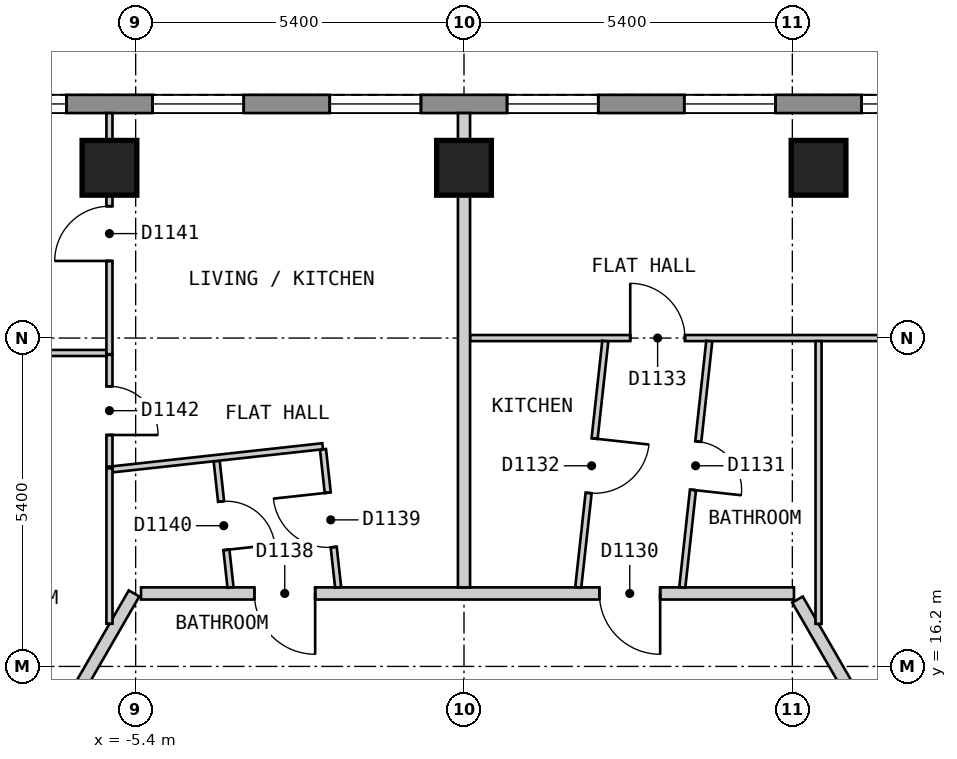
"""IFC4 building model, lengths in metres.
Left out: names, types, materials, properties, quantities, classifications, styles, units other than length and angle.
Written with IfcOpenShell. Run it as: python <this file> out.ifc"""

import sys

from ifc_helpers import new_model, si_unit, direction, frame, frame_2d, origin, origin_2d, place, context, subcontext, project, spatial, polyline, rectangle, outline, extrude, element, fill, save


model = new_model("IFC4")
c1 = context("Model", 3, precision=1e-05, world=origin(), true_north=direction((0.0, 1.0)))
c2 = subcontext(c1, "Body", "Model", "MODEL_VIEW")
j1 = project(units=[si_unit("LENGTHUNIT", "METRE"), si_unit("PLANEANGLEUNIT", "RADIAN")], contexts=[c1])
p1 = place(None, origin())
s1 = spatial("IfcSite", under=j1, at=p1, CompositionType="ELEMENT")
p2 = place(p1, origin())
s2 = spatial("IfcBuilding", under=s1, at=p2, CompositionType="ELEMENT")
p3 = place(p2, frame((0.0, 0.0, 138.6)))
s3 = spatial("IfcBuildingStorey", under=s2, at=p3, CompositionType="ELEMENT", Elevation=138.6)
for number, where, z_axis, x_axis in (
    (1, (5.831, 24.4, 0.0), (0.0, 0.0, 1.0), (-1.0, 0.0, 0.0)),
    (2, (0.0, 24.4, 0.0), (0.0, 0.0, 1.0), (-1.0, 0.0, 0.0)),
    (3, (-5.831, 24.4, 0.0), (0.0, 0.0, 1.0), (-1.0, 0.0, 0.0)),
):
    element("IfcColumn", number, at=place(p3, frame(where, z_axis=z_axis, x_axis=x_axis)), inside=s3, PredefinedType="COLUMN", context=c2, shape_type="SweptSolid", body=[
        extrude(rectangle(XDim=0.9, YDim=0.9, at=origin_2d()), origin(), (0.0, 0.0, 1.0), 3.0),
    ])
p4 = place(p3, frame((12.355, 25.45, 0.0), z_axis=(0.0, 0.0, 1.0), x_axis=(-1.0, 0.0, 0.0)))
e4 = element("IfcWall", 4, at=p4, inside=s3, PredefinedType="SOLIDWALL", context=c2, shape_type="SweptSolid", body=[
    extrude(outline(polyline([(0.0, -0.15), (24.71, -0.15), (24.63, 0.15), (0.08, 0.15), (0.0, -0.15)])), origin(), (0.0, 0.0, 1.0), 2.7),
])
p5 = place(p4, frame((1.401, 0.0, 0.15)))
e5 = element("IfcOpeningElement", 5, at=p5, cuts=e4, PredefinedType="OPENING", context=c2, shape_type="SweptSolid", body=[
    extrude(rectangle(XDim=1.5, YDim=2.1, at=frame_2d((0.75, 1.05))), frame((0.0, 0.16, 0.0), z_axis=(0.0, -1.0, 0.0), x_axis=(1.0, 0.0, 0.0)), (0.0, 0.0, 1.0), 0.32),
])
p6 = place(p4, frame((4.316, 0.0, 0.15)))
e6 = element("IfcOpeningElement", 6, at=p6, cuts=e4, PredefinedType="OPENING", context=c2, shape_type="SweptSolid", body=[
    extrude(rectangle(XDim=1.5, YDim=2.1, at=frame_2d((0.75, 1.05))), frame((0.0, 0.16, 0.0), z_axis=(0.0, -1.0, 0.0), x_axis=(1.0, 0.0, 0.0)), (0.0, 0.0, 1.0), 0.32),
])
p7 = place(p4, frame((7.232, 0.0, 0.15)))
e7 = element("IfcOpeningElement", 7, at=p7, cuts=e4, PredefinedType="OPENING", context=c2, shape_type="SweptSolid", body=[
    extrude(rectangle(XDim=1.5, YDim=2.1, at=frame_2d((0.75, 1.05))), frame((0.0, 0.16, 0.0), z_axis=(0.0, -1.0, 0.0), x_axis=(1.0, 0.0, 0.0)), (0.0, 0.0, 1.0), 0.32),
])
p8 = place(p4, frame((10.147, 0.0, 0.15)))
e8 = element("IfcOpeningElement", 8, at=p8, cuts=e4, PredefinedType="OPENING", context=c2, shape_type="SweptSolid", body=[
    extrude(rectangle(XDim=1.5, YDim=2.1, at=frame_2d((0.75, 1.05))), frame((0.0, 0.16, 0.0), z_axis=(0.0, -1.0, 0.0), x_axis=(1.0, 0.0, 0.0)), (0.0, 0.0, 1.0), 0.32),
])
p9 = place(p4, frame((13.063, 0.0, 0.15)))
e9 = element("IfcOpeningElement", 9, at=p9, cuts=e4, PredefinedType="OPENING", context=c2, shape_type="SweptSolid", body=[
    extrude(rectangle(XDim=1.5, YDim=2.1, at=frame_2d((0.75, 1.05))), frame((0.0, 0.16, 0.0), z_axis=(0.0, -1.0, 0.0), x_axis=(1.0, 0.0, 0.0)), (0.0, 0.0, 1.0), 0.32),
])
p10 = place(p4, frame((15.978, 0.0, 0.15)))
e10 = element("IfcOpeningElement", 10, at=p10, cuts=e4, PredefinedType="OPENING", context=c2, shape_type="SweptSolid", body=[
    extrude(rectangle(XDim=1.5, YDim=2.1, at=frame_2d((0.75, 1.05))), frame((0.0, 0.16, 0.0), z_axis=(0.0, -1.0, 0.0), x_axis=(1.0, 0.0, 0.0)), (0.0, 0.0, 1.0), 0.32),
])
p11 = place(p4, frame((18.894, 0.0, 0.15)))
e11 = element("IfcOpeningElement", 11, at=p11, cuts=e4, PredefinedType="OPENING", context=c2, shape_type="SweptSolid", body=[
    extrude(rectangle(XDim=1.5, YDim=2.1, at=frame_2d((0.75, 1.05))), frame((0.0, 0.16, 0.0), z_axis=(0.0, -1.0, 0.0), x_axis=(1.0, 0.0, 0.0)), (0.0, 0.0, 1.0), 0.32),
])
p12 = place(p4, frame((21.809, 0.0, 0.15)))
e12 = element("IfcOpeningElement", 12, at=p12, cuts=e4, PredefinedType="OPENING", context=c2, shape_type="SweptSolid", body=[
    extrude(rectangle(XDim=1.5, YDim=2.1, at=frame_2d((0.75, 1.05))), frame((0.0, 0.16, 0.0), z_axis=(0.0, -1.0, 0.0), x_axis=(1.0, 0.0, 0.0)), (0.0, 0.0, 1.0), 0.32),
])
p13 = place(p3, frame((5.485, 17.3, 0.0), z_axis=(0.0, 0.0, 1.0), x_axis=(0.500027479704, -0.866009537788, 0.0)))
e13 = element("IfcWall", 13, at=p13, inside=s3, PredefinedType="PARTITIONING", context=c2, shape_type="SweptSolid", body=[
    extrude(rectangle(XDim=2.309, YDim=0.2, at=frame_2d((1.155, 0.0))), origin(), (0.0, 0.0, 1.0), 2.7),
])
p14 = place(p3, frame((-5.312, 17.4, 0.0), z_axis=(0.0, 0.0, 1.0), x_axis=(1.0, 0.0, 0.0)))
e14 = element("IfcWall", 14, at=p14, inside=s3, PredefinedType="PARTITIONING", context=c2, shape_type="SweptSolid", body=[
    extrude(rectangle(XDim=10.739, YDim=0.2, at=frame_2d((5.37, 0.0))), origin(), (0.0, 0.0, 1.0), 2.7),
])
p15 = place(p14, frame((7.538, 0.0, 0.0)))
e15 = element("IfcOpeningElement", 15, at=p15, cuts=e14, PredefinedType="OPENING", context=c2, shape_type="SweptSolid", body=[
    extrude(rectangle(XDim=1.0, YDim=2.1, at=frame_2d((0.5, 1.05))), frame((0.0, 0.11, 0.0), z_axis=(0.0, -1.0, 0.0), x_axis=(1.0, 0.0, 0.0)), (0.0, 0.0, 1.0), 0.22),
])
p16 = place(p14, frame((1.864, 0.0, 0.0)))
e16 = element("IfcOpeningElement", 16, at=p16, cuts=e14, PredefinedType="OPENING", context=c2, shape_type="SweptSolid", body=[
    extrude(rectangle(XDim=1.0, YDim=2.1, at=frame_2d((0.5, 1.05))), frame((0.0, 0.11, 0.0), z_axis=(0.0, -1.0, 0.0), x_axis=(1.0, 0.0, 0.0)), (0.0, 0.0, 1.0), 0.22),
])
p17 = place(p3, frame((-6.697, 15.2, 0.0), z_axis=(0.0, 0.0, 1.0), x_axis=(0.499963722229, 0.866046347752, 0.0)))
e17 = element("IfcWall", 17, at=p17, inside=s3, PredefinedType="PARTITIONING", context=c2, shape_type="SweptSolid", body=[
    extrude(rectangle(XDim=2.54, YDim=0.2, at=frame_2d((1.27, 0.0))), origin(), (0.0, 0.0, 1.0), 2.7),
])
p18 = place(p3, frame((-2.319, 19.77, 0.0), z_axis=(0.0, 0.0, 1.0), x_axis=(0.109046821538, -0.994036614372, 0.0)))
e18 = element("IfcWall", 18, at=p18, inside=s3, PredefinedType="PARTITIONING", context=c2, shape_type="SweptSolid", body=[
    extrude(rectangle(XDim=2.284, YDim=0.1, at=frame_2d((1.142, 0.0))), origin(), (0.0, 0.0, 1.0), 2.7),
])
p19 = place(p18, frame((0.717, 0.0, 0.0)))
e19 = element("IfcOpeningElement", 19, at=p19, cuts=e18, PredefinedType="OPENING", context=c2, shape_type="SweptSolid", body=[
    extrude(rectangle(XDim=0.9, YDim=2.1, at=frame_2d((0.45, 1.05))), frame((0.0, 0.06, 0.0), z_axis=(0.0, -1.0, 0.0), x_axis=(1.0, 0.0, 0.0)), (0.0, 0.0, 1.0), 0.12),
])
p20 = place(p3, frame((-4.068, 19.579, 0.0), z_axis=(0.0, 0.0, 1.0), x_axis=(0.109022161139, -0.994039319333, 0.0)))
e20 = element("IfcWall", 20, at=p20, inside=s3, PredefinedType="PARTITIONING", context=c2, shape_type="SweptSolid", body=[
    extrude(rectangle(XDim=2.092, YDim=0.1, at=frame_2d((1.046, 0.0))), origin(), (0.0, 0.0, 1.0), 2.7),
])
p21 = place(p20, frame((0.671, 0.0, 0.0)))
e21 = element("IfcOpeningElement", 21, at=p21, cuts=e20, PredefinedType="OPENING", context=c2, shape_type="SweptSolid", body=[
    extrude(rectangle(XDim=0.8, YDim=2.1, at=frame_2d((0.4, 1.05))), frame((0.0, 0.06, 0.0), z_axis=(0.0, -1.0, 0.0), x_axis=(1.0, 0.0, 0.0)), (0.0, 0.0, 1.0), 0.12),
])
p22 = place(p3, frame((-5.831, 21.325, 0.0), z_axis=(0.0, 0.0, 1.0), x_axis=(0.0, -1.0, 0.0)))
e22 = element("IfcWall", 22, at=p22, inside=s3, PredefinedType="PARTITIONING", context=c2, shape_type="SweptSolid", body=[
    extrude(rectangle(XDim=1.839, YDim=0.1, at=frame_2d((0.919, 0.0))), origin(), (0.0, 0.0, 1.0), 2.7),
])
p23 = place(p22, frame((0.519, 0.0, 0.0)))
e23 = element("IfcOpeningElement", 23, at=p23, cuts=e22, PredefinedType="OPENING", context=c2, shape_type="SweptSolid", body=[
    extrude(rectangle(XDim=0.8, YDim=2.1, at=frame_2d((0.4, 1.05))), frame((0.0, 0.06, 0.0), z_axis=(0.0, -1.0, 0.0), x_axis=(1.0, 0.0, 0.0)), (0.0, 0.0, 1.0), 0.12),
])
p24 = place(p3, frame((-7.652, 21.355, 0.0), z_axis=(0.0, 0.0, 1.0), x_axis=(1.0, 0.0, 0.0)))
e24 = element("IfcWall", 24, at=p24, inside=s3, PredefinedType="PARTITIONING", context=c2, shape_type="SweptSolid", body=[
    extrude(rectangle(XDim=1.771, YDim=0.1, at=frame_2d((0.885, 0.0))), origin(), (0.0, 0.0, 1.0), 2.7),
])
p25 = place(p3, frame((0.1, 21.6, 0.0), z_axis=(0.0, 0.0, 1.0), x_axis=(1.0, 0.0, 0.0)))
e25 = element("IfcWall", 25, at=p25, inside=s3, PredefinedType="PARTITIONING", context=c2, shape_type="SweptSolid", body=[
    extrude(rectangle(XDim=7.752, YDim=0.1, at=frame_2d((3.876, 0.0))), origin(), (0.0, 0.0, 1.0), 2.7),
])
p26 = place(p25, frame((2.634, 0.0, 0.0)))
e26 = element("IfcOpeningElement", 26, at=p26, cuts=e25, PredefinedType="OPENING", context=c2, shape_type="SweptSolid", body=[
    extrude(rectangle(XDim=0.9, YDim=2.1, at=frame_2d((0.45, 1.05))), frame((0.0, 0.06, 0.0), z_axis=(0.0, -1.0, 0.0), x_axis=(1.0, 0.0, 0.0)), (0.0, 0.0, 1.0), 0.12),
])
p27 = place(p3, frame((-5.781, 19.441, 0.0), z_axis=(0.0, 0.0, 1.0), x_axis=(0.994005576935, 0.109329378588, 0.0)))
e27 = element("IfcWall", 27, at=p27, inside=s3, PredefinedType="PARTITIONING", context=c2, shape_type="SweptSolid", body=[
    extrude(rectangle(XDim=3.477, YDim=0.1, at=frame_2d((1.738, 0.0))), origin(), (0.0, 0.0, 1.0), 2.7),
])
p28 = place(p3, frame((3.59, 17.5, 0.0), z_axis=(0.0, 0.0, 1.0), x_axis=(0.108938463119, 0.994048495423, 0.0)))
e28 = element("IfcWall", 28, at=p28, inside=s3, PredefinedType="PARTITIONING", context=c2, shape_type="SweptSolid", body=[
    extrude(rectangle(XDim=4.074, YDim=0.1, at=frame_2d((2.037, 0.0))), origin(), (0.0, 0.0, 1.0), 2.7),
])
p29 = place(p28, frame((1.612, 0.0, 0.0)))
e29 = element("IfcOpeningElement", 29, at=p29, cuts=e28, PredefinedType="OPENING", context=c2, shape_type="SweptSolid", body=[
    extrude(rectangle(XDim=0.8, YDim=2.1, at=frame_2d((0.4, 1.05))), frame((0.0, 0.06, 0.0), z_axis=(0.0, -1.0, 0.0), x_axis=(1.0, 0.0, 0.0)), (0.0, 0.0, 1.0), 0.12),
])
p30 = place(p3, frame((1.879, 17.5, 0.0), z_axis=(0.0, 0.0, 1.0), x_axis=(0.10923450369, 0.994016007519, 0.0)))
e30 = element("IfcWall", 30, at=p30, inside=s3, PredefinedType="PARTITIONING", context=c2, shape_type="SweptSolid", body=[
    extrude(rectangle(XDim=4.074, YDim=0.1, at=frame_2d((2.037, 0.0))), origin(), (0.0, 0.0, 1.0), 2.7),
])
p31 = place(p30, frame((1.562, 0.0, 0.0)))
e31 = element("IfcOpeningElement", 31, at=p31, cuts=e30, PredefinedType="OPENING", context=c2, shape_type="SweptSolid", body=[
    extrude(rectangle(XDim=0.9, YDim=2.1, at=frame_2d((0.45, 1.05))), frame((0.0, 0.06, 0.0), z_axis=(0.0, -1.0, 0.0), x_axis=(1.0, 0.0, 0.0)), (0.0, 0.0, 1.0), 0.12),
])
p32 = place(p3, frame((5.831, 16.9, 0.0), z_axis=(0.0, 0.0, 1.0), x_axis=(0.0, 1.0, 0.0)))
e32 = element("IfcWall", 32, at=p32, inside=s3, PredefinedType="PARTITIONING", context=c2, shape_type="SweptSolid", body=[
    extrude(rectangle(XDim=4.65, YDim=0.1, at=frame_2d((2.325, 0.0))), origin(), (0.0, 0.0, 1.0), 2.7),
])
p33 = place(p3, frame((-5.831, 16.903, 0.0), z_axis=(0.0, 0.0, 1.0), x_axis=(0.0, 1.0, 0.0)))
e33 = element("IfcWall", 33, at=p33, inside=s3, PredefinedType="PARTITIONING", context=c2, shape_type="SweptSolid", body=[
    extrude(rectangle(XDim=2.553, YDim=0.1, at=frame_2d((1.276, 0.0))), origin(), (0.0, 0.0, 1.0), 2.7),
])
p34 = place(p3, frame((-5.831, 21.335, 0.0), z_axis=(0.0, 0.0, 1.0), x_axis=(0.0, 1.0, 0.0)))
e34 = element("IfcWall", 34, at=p34, inside=s3, PredefinedType="PARTITIONING", context=c2, shape_type="SweptSolid", body=[
    extrude(rectangle(XDim=3.965, YDim=0.1, at=frame_2d((1.982, 0.0))), origin(), (0.0, 0.0, 1.0), 2.7),
])
p35 = place(p34, frame((1.533, 0.0, 0.0)))
e35 = element("IfcOpeningElement", 35, at=p35, cuts=e34, PredefinedType="OPENING", context=c2, shape_type="SweptSolid", body=[
    extrude(rectangle(XDim=0.9, YDim=2.1, at=frame_2d((0.45, 1.05))), frame((0.0, 0.06, 0.0), z_axis=(0.0, -1.0, 0.0), x_axis=(1.0, 0.0, 0.0)), (0.0, 0.0, 1.0), 0.12),
])
p36 = place(p3, frame((0.0, 17.5, 0.0), z_axis=(0.0, 0.0, 1.0), x_axis=(0.0, 1.0, 0.0)))
e36 = element("IfcWall", 36, at=p36, inside=s3, PredefinedType="PARTITIONING", context=c2, shape_type="SweptSolid", body=[
    extrude(rectangle(XDim=7.8, YDim=0.2, at=frame_2d((3.9, 0.0))), origin(), (0.0, 0.0, 1.0), 2.7),
])
p37 = place(p6, origin())
e37 = element("IfcWindow", 37, at=p37, inside=s3, PartitioningType="SINGLE_PANEL", PredefinedType="WINDOW", context=c2, shape_type="SweptSolid", body=[
    extrude(rectangle(XDim=1.5, YDim=2.1, at=frame_2d((0.75, 1.05))), frame((0.0, 0.03, 0.0), z_axis=(0.0, -1.0, 0.0), x_axis=(1.0, 0.0, 0.0)), (0.0, 0.0, 1.0), 0.06),
])
fill(e6, e37)
p38 = place(p7, origin())
e38 = element("IfcWindow", 38, at=p38, inside=s3, PartitioningType="SINGLE_PANEL", PredefinedType="WINDOW", context=c2, shape_type="SweptSolid", body=[
    extrude(rectangle(XDim=1.5, YDim=2.1, at=frame_2d((0.75, 1.05))), frame((0.0, 0.03, 0.0), z_axis=(0.0, -1.0, 0.0), x_axis=(1.0, 0.0, 0.0)), (0.0, 0.0, 1.0), 0.06),
])
fill(e7, e38)
p39 = place(p8, origin())
e39 = element("IfcWindow", 39, at=p39, inside=s3, PartitioningType="SINGLE_PANEL", PredefinedType="WINDOW", context=c2, shape_type="SweptSolid", body=[
    extrude(rectangle(XDim=1.5, YDim=2.1, at=frame_2d((0.75, 1.05))), frame((0.0, 0.03, 0.0), z_axis=(0.0, -1.0, 0.0), x_axis=(1.0, 0.0, 0.0)), (0.0, 0.0, 1.0), 0.06),
])
fill(e8, e39)
p40 = place(p9, origin())
e40 = element("IfcWindow", 40, at=p40, inside=s3, PartitioningType="SINGLE_PANEL", PredefinedType="WINDOW", context=c2, shape_type="SweptSolid", body=[
    extrude(rectangle(XDim=1.5, YDim=2.1, at=frame_2d((0.75, 1.05))), frame((0.0, 0.03, 0.0), z_axis=(0.0, -1.0, 0.0), x_axis=(1.0, 0.0, 0.0)), (0.0, 0.0, 1.0), 0.06),
])
fill(e9, e40)
p41 = place(p10, origin())
e41 = element("IfcWindow", 41, at=p41, inside=s3, PartitioningType="SINGLE_PANEL", PredefinedType="WINDOW", context=c2, shape_type="SweptSolid", body=[
    extrude(rectangle(XDim=1.5, YDim=2.1, at=frame_2d((0.75, 1.05))), frame((0.0, 0.03, 0.0), z_axis=(0.0, -1.0, 0.0), x_axis=(1.0, 0.0, 0.0)), (0.0, 0.0, 1.0), 0.06),
])
fill(e10, e41)
p42 = place(p11, origin())
e42 = element("IfcWindow", 42, at=p42, inside=s3, PartitioningType="SINGLE_PANEL", PredefinedType="WINDOW", context=c2, shape_type="SweptSolid", body=[
    extrude(rectangle(XDim=1.5, YDim=2.1, at=frame_2d((0.75, 1.05))), frame((0.0, 0.03, 0.0), z_axis=(0.0, -1.0, 0.0), x_axis=(1.0, 0.0, 0.0)), (0.0, 0.0, 1.0), 0.06),
])
fill(e11, e42)
p43 = place(p15, origin())
e43 = element("IfcDoor", 43, at=p43, inside=s3, OperationType="SINGLE_SWING_RIGHT", PredefinedType="DOOR", context=c2, shape_type="SweptSolid", body=[
    extrude(rectangle(XDim=1.0, YDim=2.1, at=frame_2d((0.5, 1.05))), frame((0.0, 0.025, 0.0), z_axis=(0.0, -1.0, 0.0), x_axis=(1.0, 0.0, 0.0)), (0.0, 0.0, 1.0), 0.05),
])
fill(e15, e43)
p44 = place(p29, origin())
e44 = element("IfcDoor", 44, at=p44, inside=s3, OperationType="SINGLE_SWING_LEFT", PredefinedType="DOOR", context=c2, shape_type="SweptSolid", body=[
    extrude(rectangle(XDim=0.8, YDim=2.1, at=frame_2d((0.4, 1.05))), frame((0.0, 0.025, 0.0), z_axis=(0.0, -1.0, 0.0), x_axis=(1.0, 0.0, 0.0)), (0.0, 0.0, 1.0), 0.05),
])
fill(e29, e44)
p45 = place(p31, origin())
e45 = element("IfcDoor", 45, at=p45, inside=s3, OperationType="SINGLE_SWING_RIGHT", PredefinedType="DOOR", context=c2, shape_type="SweptSolid", body=[
    extrude(rectangle(XDim=0.9, YDim=2.1, at=frame_2d((0.45, 1.05))), frame((0.0, 0.025, 0.0), z_axis=(0.0, -1.0, 0.0), x_axis=(1.0, 0.0, 0.0)), (0.0, 0.0, 1.0), 0.05),
])
fill(e31, e45)
p46 = place(p26, origin())
e46 = element("IfcDoor", 46, at=p46, inside=s3, OperationType="SINGLE_SWING_LEFT", PredefinedType="DOOR", context=c2, shape_type="SweptSolid", body=[
    extrude(rectangle(XDim=0.9, YDim=2.1, at=frame_2d((0.45, 1.05))), frame((0.0, 0.025, 0.0), z_axis=(0.0, -1.0, 0.0), x_axis=(1.0, 0.0, 0.0)), (0.0, 0.0, 1.0), 0.05),
])
fill(e26, e46)
p47 = place(p16, origin())
e47 = element("IfcDoor", 47, at=p47, inside=s3, OperationType="SINGLE_SWING_RIGHT", PredefinedType="DOOR", context=c2, shape_type="SweptSolid", body=[
    extrude(rectangle(XDim=1.0, YDim=2.1, at=frame_2d((0.5, 1.05))), frame((0.0, 0.025, 0.0), z_axis=(0.0, -1.0, 0.0), x_axis=(1.0, 0.0, 0.0)), (0.0, 0.0, 1.0), 0.05),
])
fill(e16, e47)
p48 = place(p19, origin())
e48 = element("IfcDoor", 48, at=p48, inside=s3, OperationType="SINGLE_SWING_LEFT", PredefinedType="DOOR", context=c2, shape_type="SweptSolid", body=[
    extrude(rectangle(XDim=0.9, YDim=2.1, at=frame_2d((0.45, 1.05))), frame((0.0, 0.025, 0.0), z_axis=(0.0, -1.0, 0.0), x_axis=(1.0, 0.0, 0.0)), (0.0, 0.0, 1.0), 0.05),
])
fill(e19, e48)
p49 = place(p21, origin())
e49 = element("IfcDoor", 49, at=p49, inside=s3, OperationType="SINGLE_SWING_RIGHT", PredefinedType="DOOR", context=c2, shape_type="SweptSolid", body=[
    extrude(rectangle(XDim=0.8, YDim=2.1, at=frame_2d((0.4, 1.05))), frame((0.0, 0.025, 0.0), z_axis=(0.0, -1.0, 0.0), x_axis=(1.0, 0.0, 0.0)), (0.0, 0.0, 1.0), 0.05),
])
fill(e21, e49)
p50 = place(p35, origin())
e50 = element("IfcDoor", 50, at=p50, inside=s3, OperationType="SINGLE_SWING_LEFT", PredefinedType="DOOR", context=c2, shape_type="SweptSolid", body=[
    extrude(rectangle(XDim=0.9, YDim=2.1, at=frame_2d((0.45, 1.05))), frame((0.0, 0.025, 0.0), z_axis=(0.0, -1.0, 0.0), x_axis=(1.0, 0.0, 0.0)), (0.0, 0.0, 1.0), 0.05),
])
fill(e35, e50)
p51 = place(p23, origin())
e51 = element("IfcDoor", 51, at=p51, inside=s3, OperationType="SINGLE_SWING_RIGHT", PredefinedType="DOOR", context=c2, shape_type="SweptSolid", body=[
    extrude(rectangle(XDim=0.8, YDim=2.1, at=frame_2d((0.4, 1.05))), frame((0.0, 0.025, 0.0), z_axis=(0.0, -1.0, 0.0), x_axis=(1.0, 0.0, 0.0)), (0.0, 0.0, 1.0), 0.05),
])
fill(e23, e51)
save(model, sys.argv[1])
